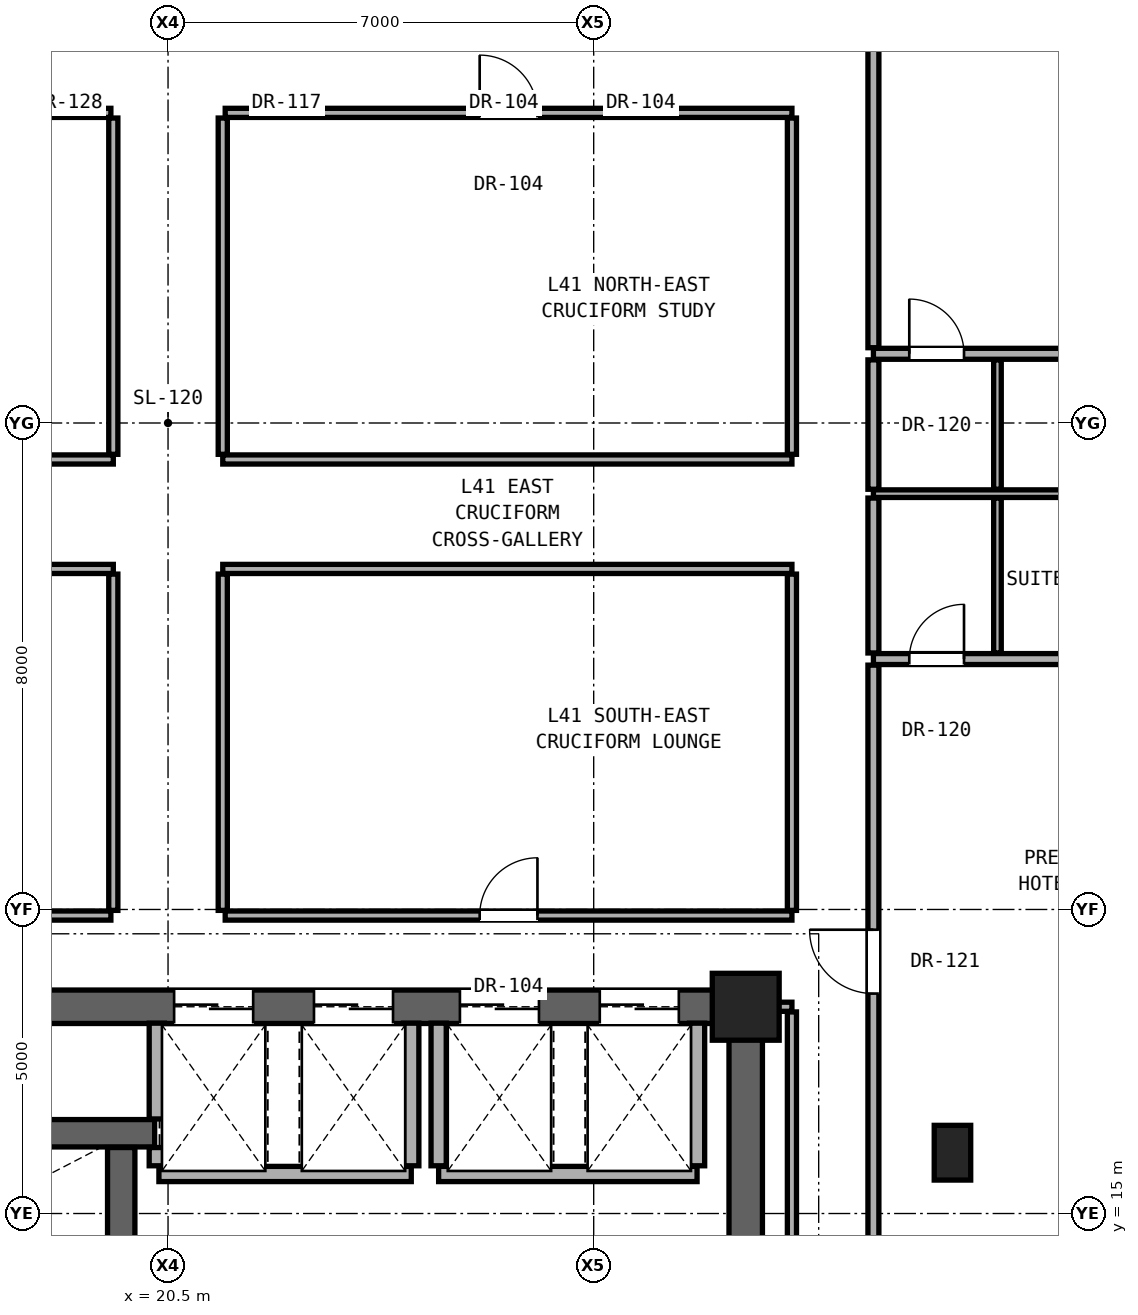
"""IFC4 building model, lengths in metres.
Left out: names, types, materials, properties, quantities, classifications, styles, units other than length and angle.
Written with IfcOpenShell. Run it as: python <this file> out.ifc"""

import sys

from ifc_helpers import new_model, si_unit, direction, frame, frame_2d, origin, origin_2d, place, context, subcontext, project, spatial, rectangle, extrude, element, fill, save


model = new_model("IFC4")
c1 = context("Model", 3, precision=1e-05, world=origin(), true_north=direction((0.0, 1.0)))
c2 = subcontext(c1, "Body", "Model", "MODEL_VIEW")
j1 = project(units=[si_unit("LENGTHUNIT", "METRE"), si_unit("PLANEANGLEUNIT", "RADIAN")], contexts=[c1])
p1 = place(None, origin())
s1 = spatial("IfcSite", under=j1, at=p1, CompositionType="ELEMENT")
p2 = place(p1, origin())
s2 = spatial("IfcBuilding", under=s1, at=p2, CompositionType="ELEMENT")
p3 = place(p2, frame((0.0, 0.0, 144.5)))
s3 = spatial("IfcBuildingStorey", under=s2, at=p3, CompositionType="ELEMENT", Elevation=144.5)
p4 = place(p3, frame((30.0, 18.4, 0.0), z_axis=(0.0, 0.0, 1.0), x_axis=(1.0, 0.0, 0.0)))
e1 = element("IfcColumn", 1, at=p4, inside=s3, PredefinedType="COLUMN", context=c2, shape_type="SweptSolid", body=[
    extrude(rectangle(XDim=1.1, YDim=1.1, at=origin_2d()), origin(), (0.0, 0.0, 1.0), 3.3),
])
p5 = place(p3, frame((33.4, 16.0, 0.0), z_axis=(0.0, 0.0, 1.0), x_axis=(1.0, 0.0, 0.0)))
e2 = element("IfcColumn", 2, at=p5, inside=s3, PredefinedType="PILASTER", context=c2, shape_type="SweptSolid", body=[
    extrude(rectangle(XDim=0.6, YDim=0.9, at=origin_2d()), origin(), (0.0, 0.0, 1.0), 3.3),
])
p6 = place(p3, frame((30.0, 12.4, 0.0), z_axis=(0.0, 0.0, 1.0), x_axis=(0.0, 1.0, 0.0)))
e3 = element("IfcWall", 3, at=p6, inside=s3, PredefinedType="SHEAR", context=c2, shape_type="SweptSolid", body=[
    extrude(rectangle(XDim=6.0, YDim=0.55, at=frame_2d((3.0, 0.0))), origin(), (0.0, 0.0, 1.0), 2.94),
])
p7 = place(p3, frame((11.0, 18.4, 0.0), z_axis=(0.0, 0.0, 1.0), x_axis=(1.0, 0.0, 0.0)))
e4 = element("IfcWall", 4, at=p7, inside=s3, PredefinedType="SHEAR", context=c2, shape_type="SweptSolid", body=[
    extrude(rectangle(XDim=19.0, YDim=0.55, at=frame_2d((9.5, 0.0))), origin(), (0.0, 0.0, 1.0), 2.94),
])
p8 = place(p7, frame((4.175, 0.0, 0.0)))
e5 = element("IfcOpeningElement", 5, at=p8, cuts=e4, PredefinedType="OPENING", context=c2, shape_type="SweptSolid", body=[
    extrude(rectangle(XDim=1.2, YDim=2.25, at=frame_2d((0.6, 1.125))), frame((0.0, 0.285, 0.0), z_axis=(0.0, -1.0, 0.0), x_axis=(1.0, 0.0, 0.0)), (0.0, 0.0, 1.0), 0.57),
])
p9 = place(p7, frame((9.6, 0.0, 0.0)))
e6 = element("IfcOpeningElement", 6, at=p9, cuts=e4, PredefinedType="OPENING", context=c2, shape_type="SweptSolid", body=[
    extrude(rectangle(XDim=1.3, YDim=2.3, at=frame_2d((0.65, 1.15))), frame((0.0, 0.285, 0.0), z_axis=(0.0, -1.0, 0.0), x_axis=(1.0, 0.0, 0.0)), (0.0, 0.0, 1.0), 0.57),
])
p10 = place(p7, frame((11.9, 0.0, 0.0)))
e7 = element("IfcOpeningElement", 7, at=p10, cuts=e4, PredefinedType="OPENING", context=c2, shape_type="SweptSolid", body=[
    extrude(rectangle(XDim=1.3, YDim=2.3, at=frame_2d((0.65, 1.15))), frame((0.0, 0.285, 0.0), z_axis=(0.0, -1.0, 0.0), x_axis=(1.0, 0.0, 0.0)), (0.0, 0.0, 1.0), 0.57),
])
p11 = place(p7, frame((14.3, 0.0, 0.0)))
e8 = element("IfcOpeningElement", 8, at=p11, cuts=e4, PredefinedType="OPENING", context=c2, shape_type="SweptSolid", body=[
    extrude(rectangle(XDim=1.3, YDim=2.3, at=frame_2d((0.65, 1.15))), frame((0.0, 0.285, 0.0), z_axis=(0.0, -1.0, 0.0), x_axis=(1.0, 0.0, 0.0)), (0.0, 0.0, 1.0), 0.57),
])
p12 = place(p7, frame((16.6, 0.0, 0.0)))
e9 = element("IfcOpeningElement", 9, at=p12, cuts=e4, PredefinedType="OPENING", context=c2, shape_type="SweptSolid", body=[
    extrude(rectangle(XDim=1.3, YDim=2.3, at=frame_2d((0.65, 1.15))), frame((0.0, 0.285, 0.0), z_axis=(0.0, -1.0, 0.0), x_axis=(1.0, 0.0, 0.0)), (0.0, 0.0, 1.0), 0.57),
])
p13 = place(p3, frame((20.35, 15.65, 0.0), z_axis=(0.0, 0.0, 1.0), x_axis=(1.0, 0.0, 0.0)))
e10 = element("IfcWall", 10, at=p13, inside=s3, PredefinedType="SOLIDWALL", context=c2, shape_type="SweptSolid", body=[
    extrude(rectangle(XDim=4.15, YDim=0.25, at=frame_2d((2.075, 0.0))), origin(), (0.0, 0.0, 1.0), 2.94),
])
p14 = place(p3, frame((24.95, 15.65, 0.0), z_axis=(0.0, 0.0, 1.0), x_axis=(1.0, 0.0, 0.0)))
e11 = element("IfcWall", 11, at=p14, inside=s3, PredefinedType="SOLIDWALL", context=c2, shape_type="SweptSolid", body=[
    extrude(rectangle(XDim=4.25, YDim=0.25, at=frame_2d((2.125, 0.0))), origin(), (0.0, 0.0, 1.0), 2.94),
])
p15 = place(p3, frame((11.27, 16.32, 0.0), z_axis=(0.0, 0.0, 1.0), x_axis=(1.0, 0.0, 0.0)))
e12 = element("IfcWall", 12, at=p15, inside=s3, PredefinedType="SHEAR", context=c2, shape_type="SweptSolid", body=[
    extrude(rectangle(XDim=9.01, YDim=0.45, at=frame_2d((4.505, 0.0))), origin(), (0.0, 0.0, 1.0), 2.94),
])
p16 = place(p15, frame((0.52, 0.0, 0.0)))
e13 = element("IfcOpeningElement", 13, at=p16, cuts=e12, PredefinedType="OPENING", context=c2, shape_type="SweptSolid", body=[
    extrude(rectangle(XDim=1.15, YDim=2.2, at=frame_2d((0.575, 1.1))), frame((0.0, 0.235, 0.0), z_axis=(0.0, -1.0, 0.0), x_axis=(1.0, 0.0, 0.0)), (0.0, 0.0, 1.0), 0.47),
])
p17 = place(p3, frame((30.27, 18.4, 0.0), z_axis=(0.0, 0.0, 1.0), x_axis=(1.0, 0.0, 0.0)))
e14 = element("IfcWall", 14, at=p17, inside=s3, PredefinedType="PARTITIONING", context=c2, shape_type="SweptSolid", body=[
    extrude(rectangle(XDim=0.49, YDim=0.15, at=frame_2d((0.245, 0.0))), origin(), (0.0, 0.0, 1.0), 2.316),
])
p18 = place(p3, frame((10.22, 19.9, 0.0), z_axis=(0.0, 0.0, 1.0), x_axis=(1.0, 0.0, 0.0)))
e15 = element("IfcWall", 15, at=p18, inside=s3, PredefinedType="PARTITIONING", context=c2, shape_type="SweptSolid", body=[
    extrude(rectangle(XDim=9.34, YDim=0.15, at=frame_2d((4.67, 0.0))), origin(), (0.0, 0.0, 1.0), 2.316),
])
p19 = place(p18, frame((1.66, 0.0, 0.0)))
e16 = element("IfcOpeningElement", 16, at=p19, cuts=e15, PredefinedType="OPENING", context=c2, shape_type="SweptSolid", body=[
    extrude(rectangle(XDim=0.9, YDim=2.1, at=frame_2d((0.45, 1.05))), frame((0.0, 0.085, 0.0), z_axis=(0.0, -1.0, 0.0), x_axis=(1.0, 0.0, 0.0)), (0.0, 0.0, 1.0), 0.17),
])
p20 = place(p18, frame((5.665, 0.0, 0.0)))
e17 = element("IfcOpeningElement", 17, at=p20, cuts=e15, PredefinedType="OPENING", context=c2, shape_type="SweptSolid", body=[
    extrude(rectangle(XDim=0.95, YDim=2.15, at=frame_2d((0.475, 1.075))), frame((0.0, 0.085, 0.0), z_axis=(0.0, -1.0, 0.0), x_axis=(1.0, 0.0, 0.0)), (0.0, 0.0, 1.0), 0.17),
])
p21 = place(p3, frame((21.44, 19.9, 0.0), z_axis=(0.0, 0.0, 1.0), x_axis=(1.0, 0.0, 0.0)))
e18 = element("IfcWall", 18, at=p21, inside=s3, PredefinedType="PARTITIONING", context=c2, shape_type="SweptSolid", body=[
    extrude(rectangle(XDim=9.32, YDim=0.15, at=frame_2d((4.66, 0.0))), origin(), (0.0, 0.0, 1.0), 2.316),
])
p22 = place(p21, frame((4.185, 0.0, 0.0)))
e19 = element("IfcOpeningElement", 19, at=p22, cuts=e18, PredefinedType="OPENING", context=c2, shape_type="SweptSolid", body=[
    extrude(rectangle(XDim=0.95, YDim=2.15, at=frame_2d((0.475, 1.075))), frame((0.0, 0.085, 0.0), z_axis=(0.0, -1.0, 0.0), x_axis=(1.0, 0.0, 0.0)), (0.0, 0.0, 1.0), 0.17),
])
p23 = place(p3, frame((32.1, 24.118, 0.0), z_axis=(0.0, 0.0, 1.0), x_axis=(1.0, 0.0, 0.0)))
e20 = element("IfcWall", 20, at=p23, inside=s3, PredefinedType="PARTITIONING", context=c2, shape_type="SweptSolid", body=[
    extrude(rectangle(XDim=10.52, YDim=0.18, at=frame_2d((5.26, 0.0))), origin(), (0.0, 0.0, 1.0), 2.159),
])
p24 = place(p23, frame((5.235, 0.0, 0.0)))
e21 = element("IfcOpeningElement", 21, at=p24, cuts=e20, PredefinedType="OPENING", context=c2, shape_type="SweptSolid", body=[
    extrude(rectangle(XDim=0.85, YDim=2.01, at=frame_2d((0.425, 1.005))), frame((0.0, 0.1, 0.0), z_axis=(0.0, -1.0, 0.0), x_axis=(1.0, 0.0, 0.0)), (0.0, 0.0, 1.0), 0.2),
])
p25 = place(p23, frame((0.59, 0.0, 0.0)))
e22 = element("IfcOpeningElement", 22, at=p25, cuts=e20, PredefinedType="OPENING", context=c2, shape_type="SweptSolid", body=[
    extrude(rectangle(XDim=0.9, YDim=2.1, at=frame_2d((0.45, 1.05))), frame((0.0, 0.1, 0.0), z_axis=(0.0, -1.0, 0.0), x_axis=(1.0, 0.0, 0.0)), (0.0, 0.0, 1.0), 0.2),
])
for number, where, z_axis, x_axis in (
    (23, (10.24, 25.6, 0.0), (0.0, 0.0, 1.0), (1.0, 0.0, 0.0)),
    (24, (21.4, 25.6, 0.0), (0.0, 0.0, 1.0), (1.0, 0.0, 0.0)),
):
    element("IfcWall", number, at=place(p3, frame(where, z_axis=z_axis, x_axis=x_axis)), inside=s3, PredefinedType="PARTITIONING", context=c2, shape_type="SweptSolid", body=[
        extrude(rectangle(XDim=9.36, YDim=0.15, at=frame_2d((4.68, 0.0))), origin(), (0.0, 0.0, 1.0), 2.316),
    ])
p26 = place(p3, frame((32.1, 26.838, 0.0), z_axis=(0.0, 0.0, 1.0), x_axis=(1.0, 0.0, 0.0)))
e25 = element("IfcWall", 25, at=p26, inside=s3, PredefinedType="PARTITIONING", context=c2, shape_type="SweptSolid", body=[
    extrude(rectangle(XDim=10.52, YDim=0.125, at=frame_2d((5.26, 0.0))), origin(), (0.0, 0.0, 1.0), 2.159),
])
for number, where, z_axis, x_axis in (
    (26, (10.24, 27.4, 0.0), (0.0, 0.0, 1.0), (1.0, 0.0, 0.0)),
    (27, (21.4, 27.4, 0.0), (0.0, 0.0, 1.0), (1.0, 0.0, 0.0)),
):
    element("IfcWall", number, at=place(p3, frame(where, z_axis=z_axis, x_axis=x_axis)), inside=s3, PredefinedType="PARTITIONING", context=c2, shape_type="SweptSolid", body=[
        extrude(rectangle(XDim=9.36, YDim=0.15, at=frame_2d((4.68, 0.0))), origin(), (0.0, 0.0, 1.0), 2.316),
    ])
p27 = place(p3, frame((32.1, 29.138, 0.0), z_axis=(0.0, 0.0, 1.0), x_axis=(1.0, 0.0, 0.0)))
e28 = element("IfcWall", 28, at=p27, inside=s3, PredefinedType="PARTITIONING", context=c2, shape_type="SweptSolid", body=[
    extrude(rectangle(XDim=10.52, YDim=0.18, at=frame_2d((5.26, 0.0))), origin(), (0.0, 0.0, 1.0), 2.159),
])
p28 = place(p27, frame((5.835, 0.0, 0.0)))
e29 = element("IfcOpeningElement", 29, at=p28, cuts=e28, PredefinedType="OPENING", context=c2, shape_type="SweptSolid", body=[
    extrude(rectangle(XDim=0.85, YDim=2.01, at=frame_2d((0.425, 1.005))), frame((0.0, 0.1, 0.0), z_axis=(0.0, -1.0, 0.0), x_axis=(1.0, 0.0, 0.0)), (0.0, 0.0, 1.0), 0.2),
])
p29 = place(p27, frame((0.59, 0.0, 0.0)))
e30 = element("IfcOpeningElement", 30, at=p29, cuts=e28, PredefinedType="OPENING", context=c2, shape_type="SweptSolid", body=[
    extrude(rectangle(XDim=0.9, YDim=2.1, at=frame_2d((0.45, 1.05))), frame((0.0, 0.1, 0.0), z_axis=(0.0, -1.0, 0.0), x_axis=(1.0, 0.0, 0.0)), (0.0, 0.0, 1.0), 0.2),
])
p30 = place(p3, frame((10.24, 33.1, 0.0), z_axis=(0.0, 0.0, 1.0), x_axis=(1.0, 0.0, 0.0)))
e31 = element("IfcWall", 31, at=p30, inside=s3, PredefinedType="PARTITIONING", context=c2, shape_type="SweptSolid", body=[
    extrude(rectangle(XDim=9.32, YDim=0.15, at=frame_2d((4.66, 0.0))), origin(), (0.0, 0.0, 1.0), 2.316),
])
p31 = place(p3, frame((21.44, 33.1, 0.0), z_axis=(0.0, 0.0, 1.0), x_axis=(1.0, 0.0, 0.0)))
e32 = element("IfcWall", 32, at=p31, inside=s3, PredefinedType="PARTITIONING", context=c2, shape_type="SweptSolid", body=[
    extrude(rectangle(XDim=9.32, YDim=0.15, at=frame_2d((4.66, 0.0))), origin(), (0.0, 0.0, 1.0), 2.316),
])
p32 = place(p31, frame((4.185, 0.0, 0.0)))
e33 = element("IfcOpeningElement", 33, at=p32, cuts=e32, PredefinedType="OPENING", context=c2, shape_type="SweptSolid", body=[
    extrude(rectangle(XDim=0.95, YDim=2.15, at=frame_2d((0.475, 1.075))), frame((0.0, 0.085, 0.0), z_axis=(0.0, -1.0, 0.0), x_axis=(1.0, 0.0, 0.0)), (0.0, 0.0, 1.0), 0.17),
])
for number, where, z_axis, x_axis in (
    (34, (19.6, 19.985, 0.0), (0.0, 0.0, 1.0), (0.0, 1.0, 0.0)),
    (35, (19.6, 27.485, 0.0), (0.0, 0.0, 1.0), (0.0, 1.0, 0.0)),
):
    element("IfcWall", number, at=place(p3, frame(where, z_axis=z_axis, x_axis=x_axis)), inside=s3, PredefinedType="PARTITIONING", context=c2, shape_type="SweptSolid", body=[
        extrude(rectangle(XDim=5.53, YDim=0.15, at=frame_2d((2.765, 0.0))), origin(), (0.0, 0.0, 1.0), 2.316),
    ])
p33 = place(p3, frame((19.73, 13.355, 0.0), z_axis=(0.0, 0.0, 1.0), x_axis=(0.0, 1.0, 0.0)))
e36 = element("IfcWall", 36, at=p33, inside=s3, PredefinedType="SHEAR", context=c2, shape_type="SweptSolid", body=[
    extrude(rectangle(XDim=2.73, YDim=0.45, at=frame_2d((1.365, 0.0))), origin(), (0.0, 0.0, 1.0), 2.94),
])
p34 = place(p3, frame((20.315, 15.785, 0.0), z_axis=(0.0, 0.0, 1.0), x_axis=(0.0, 1.0, 0.0)))
e37 = element("IfcWall", 37, at=p34, inside=s3, PredefinedType="SOLIDWALL", context=c2, shape_type="SweptSolid", body=[
    extrude(rectangle(XDim=0.3, YDim=0.25, at=frame_2d((0.15, 0.0))), origin(), (0.0, 0.0, 1.0), 2.94),
])
p35 = place(p3, frame((20.315, 16.555, 0.0), z_axis=(0.0, 0.0, 1.0), x_axis=(0.0, 1.0, 0.0)))
e38 = element("IfcWall", 38, at=p35, inside=s3, PredefinedType="SOLIDWALL", context=c2, shape_type="SweptSolid", body=[
    extrude(rectangle(XDim=1.575, YDim=0.25, at=frame_2d((0.788, 0.0))), origin(), (0.0, 0.0, 1.0), 2.94),
])
for number, where, z_axis, x_axis in (
    (39, (21.4, 19.985, 0.0), (0.0, 0.0, 1.0), (0.0, 1.0, 0.0)),
    (40, (21.4, 27.485, 0.0), (0.0, 0.0, 1.0), (0.0, 1.0, 0.0)),
):
    element("IfcWall", number, at=place(p3, frame(where, z_axis=z_axis, x_axis=x_axis)), inside=s3, PredefinedType="PARTITIONING", context=c2, shape_type="SweptSolid", body=[
        extrude(rectangle(XDim=5.53, YDim=0.15, at=frame_2d((2.765, 0.0))), origin(), (0.0, 0.0, 1.0), 2.316),
    ])
for number, where, z_axis, x_axis in (
    (41, (24.5, 15.785, 0.0), (0.0, 0.0, 1.0), (0.0, 1.0, 0.0)),
    (42, (24.95, 15.785, 0.0), (0.0, 0.0, 1.0), (0.0, 1.0, 0.0)),
    (43, (29.2, 15.785, 0.0), (0.0, 0.0, 1.0), (0.0, 1.0, 0.0)),
):
    element("IfcWall", number, at=place(p3, frame(where, z_axis=z_axis, x_axis=x_axis)), inside=s3, PredefinedType="SOLIDWALL", context=c2, shape_type="SweptSolid", body=[
        extrude(rectangle(XDim=2.345, YDim=0.25, at=frame_2d((1.172, 0.0))), origin(), (0.0, 0.0, 1.0), 2.94),
    ])
p36 = place(p3, frame((30.76, 12.335, 0.0), z_axis=(0.0, 0.0, 1.0), x_axis=(0.0, 1.0, 0.0)))
e44 = element("IfcWall", 44, at=p36, inside=s3, PredefinedType="PARTITIONING", context=c2, shape_type="SweptSolid", body=[
    extrude(rectangle(XDim=5.98, YDim=0.15, at=frame_2d((2.99, 0.0))), origin(), (0.0, 0.0, 1.0), 2.316),
])
for number, where, z_axis, x_axis in (
    (45, (30.76, 19.985, 0.0), (0.0, 0.0, 1.0), (0.0, 1.0, 0.0)),
    (46, (30.76, 27.485, 0.0), (0.0, 0.0, 1.0), (0.0, 1.0, 0.0)),
):
    element("IfcWall", number, at=place(p3, frame(where, z_axis=z_axis, x_axis=x_axis)), inside=s3, PredefinedType="PARTITIONING", context=c2, shape_type="SweptSolid", body=[
        extrude(rectangle(XDim=5.53, YDim=0.15, at=frame_2d((2.765, 0.0))), origin(), (0.0, 0.0, 1.0), 2.316),
    ])
p37 = place(p3, frame((32.1, 14.266, 0.0), z_axis=(0.0, 0.0, 1.0), x_axis=(0.0, 1.0, 0.0)))
e47 = element("IfcWall", 47, at=p37, inside=s3, PredefinedType="PARTITIONING", context=c2, shape_type="SweptSolid", body=[
    extrude(rectangle(XDim=9.752, YDim=0.18, at=frame_2d((4.876, 0.0))), origin(), (0.0, 0.0, 1.0), 2.316),
])
p38 = place(p37, frame((4.351, 0.0, 0.0)))
e48 = element("IfcOpeningElement", 48, at=p38, cuts=e47, PredefinedType="OPENING", context=c2, shape_type="SweptSolid", body=[
    extrude(rectangle(XDim=1.05, YDim=2.2, at=frame_2d((0.525, 1.1))), frame((0.0, 0.1, 0.0), z_axis=(0.0, -1.0, 0.0), x_axis=(1.0, 0.0, 0.0)), (0.0, 0.0, 1.0), 0.2),
])
p39 = place(p3, frame((32.1, 24.218, 0.0), z_axis=(0.0, 0.0, 1.0), x_axis=(0.0, 1.0, 0.0)))
e49 = element("IfcWall", 49, at=p39, inside=s3, PredefinedType="PARTITIONING", context=c2, shape_type="SweptSolid", body=[
    extrude(rectangle(XDim=2.547, YDim=0.18, at=frame_2d((1.274, 0.0))), origin(), (0.0, 0.0, 1.0), 2.316),
])
p40 = place(p3, frame((32.1, 26.91, 0.0), z_axis=(0.0, 0.0, 1.0), x_axis=(0.0, 1.0, 0.0)))
e50 = element("IfcWall", 50, at=p40, inside=s3, PredefinedType="PARTITIONING", context=c2, shape_type="SweptSolid", body=[
    extrude(rectangle(XDim=2.128, YDim=0.18, at=frame_2d((1.064, 0.0))), origin(), (0.0, 0.0, 1.0), 2.94),
])
p41 = place(p3, frame((32.1, 29.238, 0.0), z_axis=(0.0, 0.0, 1.0), x_axis=(0.0, 1.0, 0.0)))
e51 = element("IfcWall", 51, at=p41, inside=s3, PredefinedType="PARTITIONING", context=c2, shape_type="SweptSolid", body=[
    extrude(rectangle(XDim=12.496, YDim=0.18, at=frame_2d((6.248, 0.0))), origin(), (0.0, 0.0, 1.0), 2.316),
])
p42 = place(p41, frame((5.723, 0.0, 0.0)))
e52 = element("IfcOpeningElement", 52, at=p42, cuts=e51, PredefinedType="OPENING", context=c2, shape_type="SweptSolid", body=[
    extrude(rectangle(XDim=1.05, YDim=2.2, at=frame_2d((0.525, 1.1))), frame((0.0, 0.1, 0.0), z_axis=(0.0, -1.0, 0.0), x_axis=(1.0, 0.0, 0.0)), (0.0, 0.0, 1.0), 0.2),
])
p43 = place(p3, frame((34.14, 24.218, 0.0), z_axis=(0.0, 0.0, 1.0), x_axis=(0.0, 1.0, 0.0)))
e53 = element("IfcWall", 53, at=p43, inside=s3, PredefinedType="PARTITIONING", context=c2, shape_type="SweptSolid", body=[
    extrude(rectangle(XDim=2.547, YDim=0.125, at=frame_2d((1.274, 0.0))), origin(), (0.0, 0.0, 1.0), 2.316),
])
p44 = place(p3, frame((34.14, 26.91, 0.0), z_axis=(0.0, 0.0, 1.0), x_axis=(0.0, 1.0, 0.0)))
e54 = element("IfcWall", 54, at=p44, inside=s3, PredefinedType="PARTITIONING", context=c2, shape_type="SweptSolid", body=[
    extrude(rectangle(XDim=2.128, YDim=0.125, at=frame_2d((1.064, 0.0))), origin(), (0.0, 0.0, 1.0), 2.94),
])
p45 = place(p38, origin())
e55 = element("IfcDoor", 55, at=p45, inside=s3, OperationType="SINGLE_SWING_RIGHT", PredefinedType="DOOR", context=c2, shape_type="SweptSolid", body=[
    extrude(rectangle(XDim=1.05, YDim=2.2, at=frame_2d((0.525, 1.1))), frame((0.0, 0.025, 0.0), z_axis=(0.0, -1.0, 0.0), x_axis=(1.0, 0.0, 0.0)), (0.0, 0.0, 1.0), 0.05),
])
fill(e48, e55)
p46 = place(p25, origin())
e56 = element("IfcDoor", 56, at=p46, inside=s3, OperationType="SINGLE_SWING_RIGHT", PredefinedType="DOOR", context=c2, shape_type="SweptSolid", body=[
    extrude(rectangle(XDim=0.9, YDim=2.1, at=frame_2d((0.45, 1.05))), frame((0.0, 0.025, 0.0), z_axis=(0.0, -1.0, 0.0), x_axis=(1.0, 0.0, 0.0)), (0.0, 0.0, 1.0), 0.05),
])
fill(e22, e56)
p47 = place(p29, origin())
e57 = element("IfcDoor", 57, at=p47, inside=s3, OperationType="SINGLE_SWING_LEFT", PredefinedType="DOOR", context=c2, shape_type="SweptSolid", body=[
    extrude(rectangle(XDim=0.9, YDim=2.1, at=frame_2d((0.45, 1.05))), frame((0.0, 0.025, 0.0), z_axis=(0.0, -1.0, 0.0), x_axis=(1.0, 0.0, 0.0)), (0.0, 0.0, 1.0), 0.05),
])
fill(e30, e57)
p48 = place(p22, origin())
e58 = element("IfcDoor", 58, at=p48, inside=s3, OperationType="SINGLE_SWING_RIGHT", PredefinedType="DOOR", context=c2, shape_type="SweptSolid", body=[
    extrude(rectangle(XDim=0.95, YDim=2.15, at=frame_2d((0.475, 1.075))), frame((0.0, 0.025, 0.0), z_axis=(0.0, -1.0, 0.0), x_axis=(1.0, 0.0, 0.0)), (0.0, 0.0, 1.0), 0.05),
])
fill(e19, e58)
p49 = place(p32, origin())
e59 = element("IfcDoor", 59, at=p49, inside=s3, OperationType="SINGLE_SWING_LEFT", PredefinedType="DOOR", context=c2, shape_type="SweptSolid", body=[
    extrude(rectangle(XDim=0.95, YDim=2.15, at=frame_2d((0.475, 1.075))), frame((0.0, 0.025, 0.0), z_axis=(0.0, -1.0, 0.0), x_axis=(1.0, 0.0, 0.0)), (0.0, 0.0, 1.0), 0.05),
])
fill(e33, e59)
p50 = place(p9, origin())
e60 = element("IfcDoor", 60, at=p50, inside=s3, OperationType="DOUBLE_DOOR_SLIDING", PredefinedType="DOOR", context=c2, shape_type="SweptSolid", body=[
    extrude(rectangle(XDim=1.3, YDim=2.3, at=frame_2d((0.65, 1.15))), frame((0.0, 0.025, 0.0), z_axis=(0.0, -1.0, 0.0), x_axis=(1.0, 0.0, 0.0)), (0.0, 0.0, 1.0), 0.05),
])
fill(e6, e60)
p51 = place(p10, origin())
e61 = element("IfcDoor", 61, at=p51, inside=s3, OperationType="DOUBLE_DOOR_SLIDING", PredefinedType="DOOR", context=c2, shape_type="SweptSolid", body=[
    extrude(rectangle(XDim=1.3, YDim=2.3, at=frame_2d((0.65, 1.15))), frame((0.0, 0.025, 0.0), z_axis=(0.0, -1.0, 0.0), x_axis=(1.0, 0.0, 0.0)), (0.0, 0.0, 1.0), 0.05),
])
fill(e7, e61)
p52 = place(p11, origin())
e62 = element("IfcDoor", 62, at=p52, inside=s3, OperationType="DOUBLE_DOOR_SLIDING", PredefinedType="DOOR", context=c2, shape_type="SweptSolid", body=[
    extrude(rectangle(XDim=1.3, YDim=2.3, at=frame_2d((0.65, 1.15))), frame((0.0, 0.025, 0.0), z_axis=(0.0, -1.0, 0.0), x_axis=(1.0, 0.0, 0.0)), (0.0, 0.0, 1.0), 0.05),
])
fill(e8, e62)
p53 = place(p12, origin())
e63 = element("IfcDoor", 63, at=p53, inside=s3, OperationType="DOUBLE_DOOR_SLIDING", PredefinedType="DOOR", context=c2, shape_type="SweptSolid", body=[
    extrude(rectangle(XDim=1.3, YDim=2.3, at=frame_2d((0.65, 1.15))), frame((0.0, 0.025, 0.0), z_axis=(0.0, -1.0, 0.0), x_axis=(1.0, 0.0, 0.0)), (0.0, 0.0, 1.0), 0.05),
])
fill(e9, e63)
save(model, sys.argv[1])
